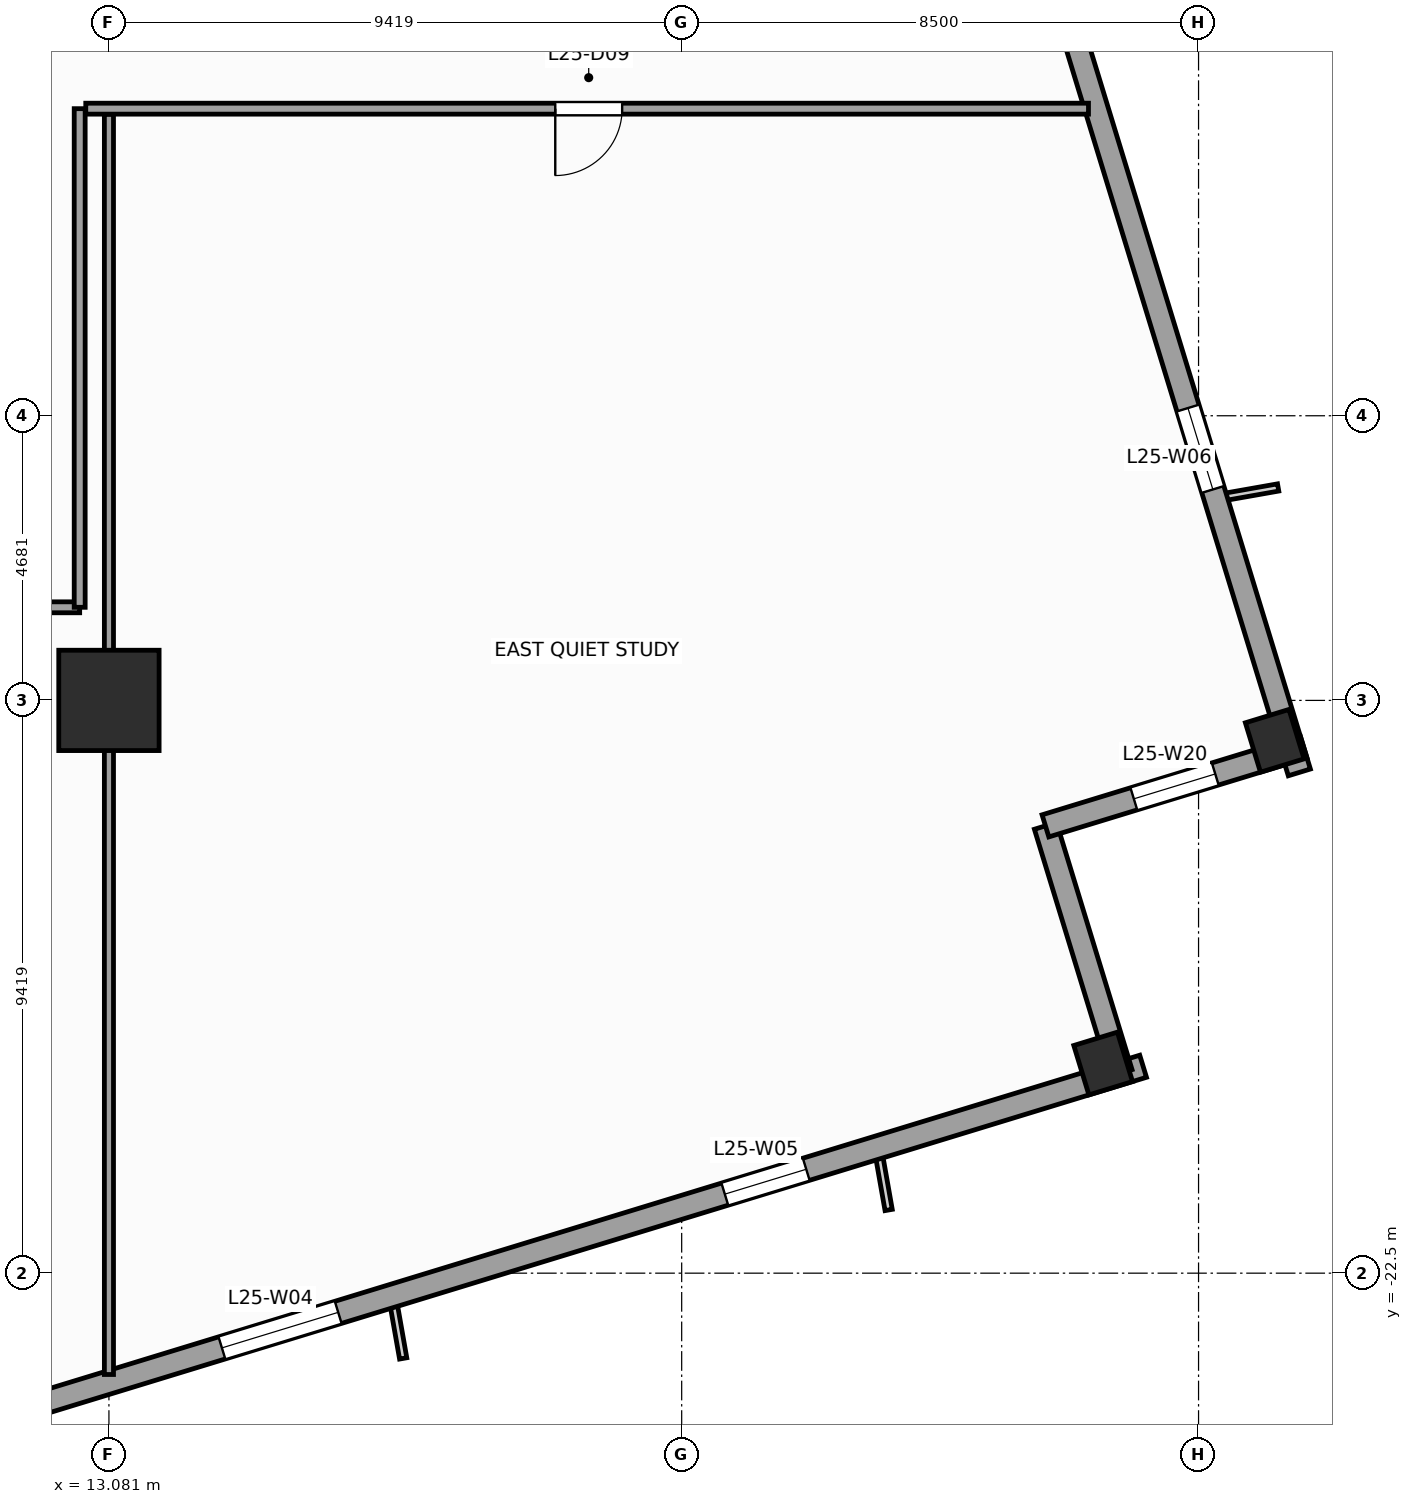
"""IFC4 building model, lengths in metres.
Left out: names, types, materials, properties, quantities, classifications, styles, units other than length and angle.
Written with IfcOpenShell. Run it as: python <this file> out.ifc"""

import sys

from ifc_helpers import new_model, si_unit, direction, frame, frame_2d, origin, origin_2d, place, context, subcontext, project, spatial, rectangle, extrude, source, transform, mapped, element, fill, save


model = new_model("IFC4")
c1 = context("Model", 3, precision=1e-05, world=origin(), true_north=direction((0.0, 1.0)))
c2 = subcontext(c1, "Body", "Model", "MODEL_VIEW")
j1 = project(units=[si_unit("LENGTHUNIT", "METRE"), si_unit("PLANEANGLEUNIT", "RADIAN")], contexts=[c1])
p1 = place(None, origin())
s1 = spatial("IfcSite", under=j1, at=p1, CompositionType="ELEMENT")
p2 = place(p1, origin())
s2 = spatial("IfcBuilding", under=s1, at=p2, CompositionType="ELEMENT")
p3 = place(p2, frame((0.0, 0.0, 107.2)))
s3 = spatial("IfcBuildingStorey", under=s2, at=p3, CompositionType="ELEMENT", Elevation=107.2)
m1 = source(origin(), c2, "Body", "SweptSolid", [
    extrude(rectangle(XDim=1.65, YDim=1.65, at=origin_2d()), origin(), (0.0, 0.0, 1.0), 4.0),
])
p4 = place(p3, frame((13.081, -13.081, 0.0), z_axis=(0.0, 0.0, 1.0), x_axis=(1.0, 0.0, 0.0)))
e1 = element("IfcColumn", 1, at=p4, inside=s3, PredefinedType="COLUMN", context=c2, shape_type="MappedRepresentation", body=[
    mapped(m1, transform((0.0, 0.0, 0.0), scale=1.0)),
])
m2 = source(origin(), c2, "Body", "SweptSolid", [
    extrude(rectangle(XDim=0.75, YDim=0.85, at=origin_2d()), origin(), (0.0, 0.0, 1.0), 4.0),
])
for number, where, z_axis, x_axis in (
    (2, (29.431, -19.052, 0.0), (0.0, 0.0, 1.0), (0.956, 0.292, 0.0)),
    (3, (32.253, -13.746, 0.0), (0.0, 0.0, 1.0), (0.956, 0.292, 0.0)),
):
    element("IfcColumn", number, at=place(p3, frame(where, z_axis=z_axis, x_axis=x_axis)), inside=s3, PredefinedType="COLUMN", context=c2, shape_type="MappedRepresentation", body=[
        mapped(m2, transform((0.0, 0.0, 0.0), scale=1.0)),
    ])
p5 = place(p3, frame((-14.265, -32.658, 0.0), z_axis=(0.0, 0.0, 1.0), x_axis=(0.956304320851, 0.292373127906, 0.0)))
e4 = element("IfcWall", 4, at=p5, inside=s3, PredefinedType="STANDARD", context=c2, shape_type="SweptSolid", body=[
    extrude(rectangle(XDim=46.38, YDim=0.38, at=frame_2d((23.19, 0.0))), origin(), (0.0, 0.0, 1.0), 3.14),
])
p6 = place(p5, frame((4.865, 0.0, 0.51)))
e5 = element("IfcOpeningElement", 5, at=p6, cuts=e4, PredefinedType="OPENING", context=c2, shape_type="SweptSolid", body=[
    extrude(rectangle(XDim=1.4, YDim=2.4, at=frame_2d((0.7, 1.2))), frame((0.0, 0.2, 0.0), z_axis=(0.0, -1.0, 0.0), x_axis=(1.0, 0.0, 0.0)), (0.0, 0.0, 1.0), 0.4),
])
p7 = place(p5, frame((10.95, 0.0, 0.51)))
e6 = element("IfcOpeningElement", 6, at=p7, cuts=e4, PredefinedType="OPENING", context=c2, shape_type="SweptSolid", body=[
    extrude(rectangle(XDim=2.0, YDim=2.4, at=frame_2d((1.0, 1.2))), frame((0.0, 0.2, 0.0), z_axis=(0.0, -1.0, 0.0), x_axis=(1.0, 0.0, 0.0)), (0.0, 0.0, 1.0), 0.4),
])
p8 = place(p5, frame((20.512, 0.0, 0.51)))
e7 = element("IfcOpeningElement", 7, at=p8, cuts=e4, PredefinedType="OPENING", context=c2, shape_type="SweptSolid", body=[
    extrude(rectangle(XDim=2.0, YDim=2.4, at=frame_2d((1.0, 1.2))), frame((0.0, 0.2, 0.0), z_axis=(0.0, -1.0, 0.0), x_axis=(1.0, 0.0, 0.0)), (0.0, 0.0, 1.0), 0.4),
])
p9 = place(p5, frame((30.538, 0.0, 0.51)))
e8 = element("IfcOpeningElement", 8, at=p9, cuts=e4, PredefinedType="OPENING", context=c2, shape_type="SweptSolid", body=[
    extrude(rectangle(XDim=2.0, YDim=2.4, at=frame_2d((1.0, 1.2))), frame((0.0, 0.2, 0.0), z_axis=(0.0, -1.0, 0.0), x_axis=(1.0, 0.0, 0.0)), (0.0, 0.0, 1.0), 0.4),
])
p10 = place(p5, frame((39.187, 0.0, 0.51)))
e9 = element("IfcOpeningElement", 9, at=p10, cuts=e4, PredefinedType="OPENING", context=c2, shape_type="SweptSolid", body=[
    extrude(rectangle(XDim=1.4, YDim=2.4, at=frame_2d((0.7, 1.2))), frame((0.0, 0.2, 0.0), z_axis=(0.0, -1.0, 0.0), x_axis=(1.0, 0.0, 0.0)), (0.0, 0.0, 1.0), 0.4),
])
p11 = place(p3, frame((29.725, -19.208, 0.0), z_axis=(0.0, 0.0, 1.0), x_axis=(-0.292345507338, 0.956312764915, 0.0)))
e10 = element("IfcWall", 10, at=p11, inside=s3, PredefinedType="STANDARD", context=c2, shape_type="SweptSolid", body=[
    extrude(rectangle(XDim=4.25, YDim=0.38, at=frame_2d((2.125, 0.0))), origin(), (0.0, 0.0, 1.0), 3.74),
])
p12 = place(p3, frame((28.482, -15.144, 0.0), z_axis=(0.0, 0.0, 1.0), x_axis=(0.956304176051, 0.292373601522, 0.0)))
e11 = element("IfcWall", 11, at=p12, inside=s3, PredefinedType="STANDARD", context=c2, shape_type="SweptSolid", body=[
    extrude(rectangle(XDim=4.44, YDim=0.38, at=frame_2d((2.22, 0.0))), origin(), (0.0, 0.0, 1.0), 3.04),
])
p13 = place(p12, frame((1.52, 0.0, 0.51)))
e12 = element("IfcOpeningElement", 12, at=p13, cuts=e11, PredefinedType="OPENING", context=c2, shape_type="SweptSolid", body=[
    extrude(rectangle(XDim=1.4, YDim=2.4, at=frame_2d((0.7, 1.2))), frame((0.0, 0.2, 0.0), z_axis=(0.0, -1.0, 0.0), x_axis=(1.0, 0.0, 0.0)), (0.0, 0.0, 1.0), 0.4),
])
p14 = place(p3, frame((32.658, -14.265, 0.0), z_axis=(0.0, 0.0, 1.0), x_axis=(-0.292373127906, 0.956304320851, 0.0)))
e13 = element("IfcWall", 13, at=p14, inside=s3, PredefinedType="STANDARD", context=c2, shape_type="SweptSolid", body=[
    extrude(rectangle(XDim=46.38, YDim=0.38, at=frame_2d((23.19, 0.0))), origin(), (0.0, 0.0, 1.0), 3.14),
])
p15 = place(p14, frame((28.265, 0.0, 0.0)))
e14 = element("IfcOpeningElement", 14, at=p15, cuts=e13, PredefinedType="OPENING", context=c2, shape_type="SweptSolid", body=[
    extrude(rectangle(XDim=1.05, YDim=2.25, at=frame_2d((0.525, 1.125))), frame((0.0, 0.2, 0.0), z_axis=(0.0, -1.0, 0.0), x_axis=(1.0, 0.0, 0.0)), (0.0, 0.0, 1.0), 0.4),
])
p16 = place(p14, frame((4.865, 0.0, 0.51)))
e15 = element("IfcOpeningElement", 15, at=p16, cuts=e13, PredefinedType="OPENING", context=c2, shape_type="SweptSolid", body=[
    extrude(rectangle(XDim=1.4, YDim=2.4, at=frame_2d((0.7, 1.2))), frame((0.0, 0.2, 0.0), z_axis=(0.0, -1.0, 0.0), x_axis=(1.0, 0.0, 0.0)), (0.0, 0.0, 1.0), 0.4),
])
p17 = place(p14, frame((14.7, 0.0, 0.51)))
e16 = element("IfcOpeningElement", 16, at=p17, cuts=e13, PredefinedType="OPENING", context=c2, shape_type="SweptSolid", body=[
    extrude(rectangle(XDim=2.0, YDim=2.4, at=frame_2d((1.0, 1.2))), frame((0.0, 0.2, 0.0), z_axis=(0.0, -1.0, 0.0), x_axis=(1.0, 0.0, 0.0)), (0.0, 0.0, 1.0), 0.4),
])
p18 = place(p14, frame((20.512, 0.0, 0.51)))
e17 = element("IfcOpeningElement", 17, at=p18, cuts=e13, PredefinedType="OPENING", context=c2, shape_type="SweptSolid", body=[
    extrude(rectangle(XDim=2.0, YDim=2.4, at=frame_2d((1.0, 1.2))), frame((0.0, 0.2, 0.0), z_axis=(0.0, -1.0, 0.0), x_axis=(1.0, 0.0, 0.0)), (0.0, 0.0, 1.0), 0.4),
])
p19 = place(p14, frame((30.538, 0.0, 0.51)))
e18 = element("IfcOpeningElement", 18, at=p19, cuts=e13, PredefinedType="OPENING", context=c2, shape_type="SweptSolid", body=[
    extrude(rectangle(XDim=2.0, YDim=2.4, at=frame_2d((1.0, 1.2))), frame((0.0, 0.2, 0.0), z_axis=(0.0, -1.0, 0.0), x_axis=(1.0, 0.0, 0.0)), (0.0, 0.0, 1.0), 0.4),
])
p20 = place(p14, frame((39.187, 0.0, 0.51)))
e19 = element("IfcOpeningElement", 19, at=p20, cuts=e13, PredefinedType="OPENING", context=c2, shape_type="SweptSolid", body=[
    extrude(rectangle(XDim=1.4, YDim=2.4, at=frame_2d((0.7, 1.2))), frame((0.0, 0.2, 0.0), z_axis=(0.0, -1.0, 0.0), x_axis=(1.0, 0.0, 0.0)), (0.0, 0.0, 1.0), 0.4),
])
p21 = place(p3, frame((1.15, -11.55, 0.0), z_axis=(0.0, 0.0, 1.0), x_axis=(1.0, 0.0, 0.0)))
e20 = element("IfcWall", 20, at=p21, inside=s3, PredefinedType="PARTITIONING", context=c2, shape_type="SweptSolid", body=[
    extrude(rectangle(XDim=11.45, YDim=0.18, at=frame_2d((5.725, 0.0))), origin(), (0.0, 0.0, 1.0), 3.74),
])
p22 = place(p21, frame((5.0, 0.0, 0.0)))
e21 = element("IfcOpeningElement", 21, at=p22, cuts=e20, PredefinedType="OPENING", context=c2, shape_type="SweptSolid", body=[
    extrude(rectangle(XDim=1.1, YDim=2.2, at=frame_2d((0.55, 1.1))), frame((0.0, 0.1, 0.0), z_axis=(0.0, -1.0, 0.0), x_axis=(1.0, 0.0, 0.0)), (0.0, 0.0, 1.0), 0.2),
])
p23 = place(p21, frame((8.736, 0.0, 0.0)))
e22 = element("IfcOpeningElement", 22, at=p23, cuts=e20, PredefinedType="OPENING", context=c2, shape_type="SweptSolid", body=[
    extrude(rectangle(XDim=1.1, YDim=2.2, at=frame_2d((0.55, 1.1))), frame((0.0, 0.1, 0.0), z_axis=(0.0, -1.0, 0.0), x_axis=(1.0, 0.0, 0.0)), (0.0, 0.0, 1.0), 0.2),
])
p24 = place(p3, frame((12.6, -11.55, 0.0), z_axis=(0.0, 0.0, 1.0), x_axis=(0.0, 1.0, 0.0)))
e23 = element("IfcWall", 23, at=p24, inside=s3, PredefinedType="PARTITIONING", context=c2, shape_type="SweptSolid", body=[
    extrude(rectangle(XDim=8.2, YDim=0.18, at=frame_2d((4.1, 0.0))), origin(), (0.0, 0.0, 1.0), 3.74),
])
p25 = place(p3, frame((12.7, -3.35, 0.0), z_axis=(0.0, 0.0, 1.0), x_axis=(1.0, 0.0, 0.0)))
e24 = element("IfcWall", 24, at=p25, inside=s3, PredefinedType="PARTITIONING", context=c2, shape_type="SweptSolid", body=[
    extrude(rectangle(XDim=16.49, YDim=0.18, at=frame_2d((8.245, 0.0))), origin(), (0.0, 0.0, 1.0), 3.74),
])
p26 = place(p25, frame((7.721, 0.0, 0.0)))
e25 = element("IfcOpeningElement", 25, at=p26, cuts=e24, PredefinedType="OPENING", context=c2, shape_type="SweptSolid", body=[
    extrude(rectangle(XDim=1.1, YDim=2.2, at=frame_2d((0.55, 1.1))), frame((0.0, 0.1, 0.0), z_axis=(0.0, -1.0, 0.0), x_axis=(1.0, 0.0, 0.0)), (0.0, 0.0, 1.0), 0.2),
])
p27 = place(p3, frame((13.081, -24.167, 0.0), z_axis=(0.0, 0.0, 1.0), x_axis=(0.0, 1.0, 0.0)))
e26 = element("IfcWall", 26, at=p27, inside=s3, PredefinedType="PARTITIONING", context=c2, shape_type="SweptSolid", body=[
    extrude(rectangle(XDim=20.721, YDim=0.15, at=frame_2d((10.361, 0.0))), origin(), (0.0, 0.0, 1.0), 2.732),
])
m3 = source(origin(), c2, "Body", "SweptSolid", [
    extrude(rectangle(XDim=2.0, YDim=2.4, at=frame_2d((1.0, 1.2))), frame((0.0, 0.03, 0.0), z_axis=(0.0, -1.0, 0.0), x_axis=(1.0, 0.0, 0.0)), (0.0, 0.0, 1.0), 0.06),
])
p28 = place(p9, origin())
e27 = element("IfcWindow", 27, at=p28, inside=s3, PartitioningType="SINGLE_PANEL", PredefinedType="WINDOW", context=c2, shape_type="MappedRepresentation", body=[
    mapped(m3, transform((0.0, 0.0, 0.0), scale=1.0)),
])
fill(e8, e27)
m4 = source(origin(), c2, "Body", "SweptSolid", [
    extrude(rectangle(XDim=1.4, YDim=2.4, at=frame_2d((0.7, 1.2))), frame((0.0, 0.03, 0.0), z_axis=(0.0, -1.0, 0.0), x_axis=(1.0, 0.0, 0.0)), (0.0, 0.0, 1.0), 0.06),
])
p29 = place(p10, origin())
e28 = element("IfcWindow", 28, at=p29, inside=s3, PartitioningType="SINGLE_PANEL", PredefinedType="WINDOW", context=c2, shape_type="MappedRepresentation", body=[
    mapped(m4, transform((0.0, 0.0, 0.0), scale=1.0)),
])
fill(e9, e28)
p30 = place(p16, origin())
e29 = element("IfcWindow", 29, at=p30, inside=s3, PartitioningType="SINGLE_PANEL", PredefinedType="WINDOW", context=c2, shape_type="MappedRepresentation", body=[
    mapped(m4, transform((0.0, 0.0, 0.0), scale=1.0)),
])
fill(e15, e29)
p31 = place(p13, origin())
e30 = element("IfcWindow", 30, at=p31, inside=s3, PartitioningType="SINGLE_PANEL", PredefinedType="WINDOW", context=c2, shape_type="MappedRepresentation", body=[
    mapped(m4, transform((0.0, 0.0, 0.0), scale=1.0)),
])
fill(e12, e30)
m5 = source(origin(), c2, "Body", "SweptSolid", [
    extrude(rectangle(XDim=1.1, YDim=2.2, at=frame_2d((0.55, 1.1))), frame((0.0, 0.025, 0.0), z_axis=(0.0, -1.0, 0.0), x_axis=(1.0, 0.0, 0.0)), (0.0, 0.0, 1.0), 0.05),
])
p32 = place(p26, frame((1.1, 0.0, 0.0), z_axis=(0.0, 0.0, 1.0), x_axis=(-1.0, 0.0, 0.0)))
e31 = element("IfcDoor", 31, at=p32, inside=s3, OperationType="SINGLE_SWING_LEFT", PredefinedType="DOOR", context=c2, shape_type="MappedRepresentation", body=[
    mapped(m5, transform((0.0, 0.0, 0.0), scale=1.0)),
])
fill(e25, e31)
save(model, sys.argv[1])
